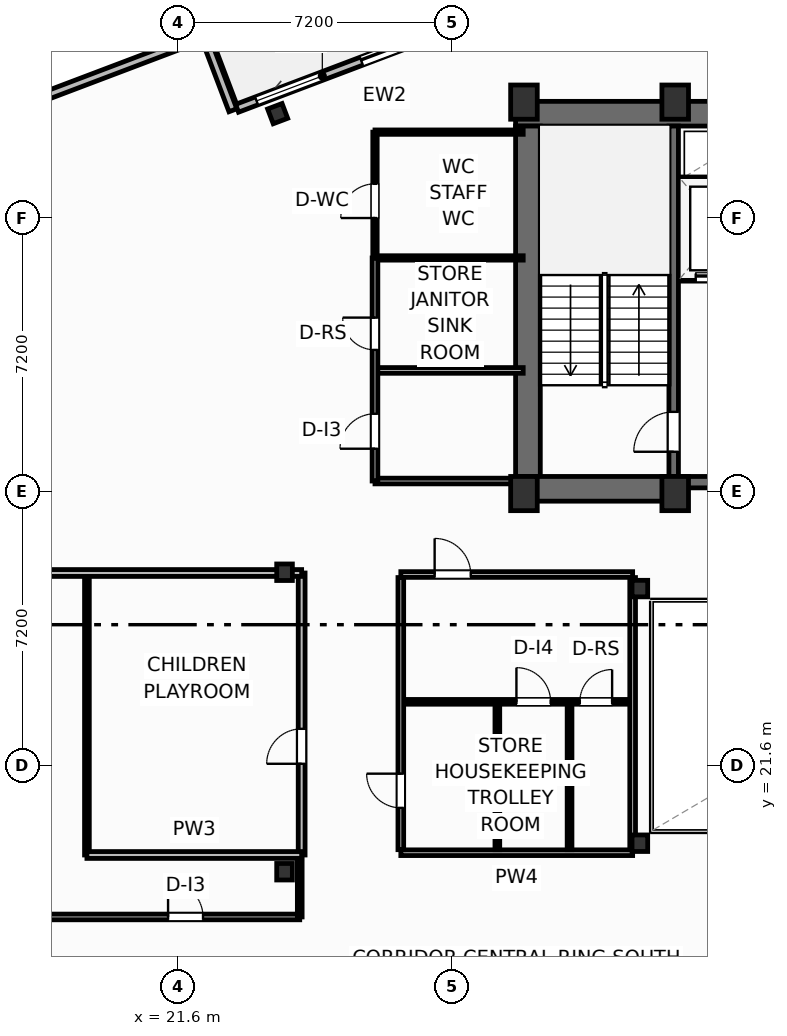
"""IFC4 building model, lengths in metres.
Left out: names, types, materials, properties, quantities, classifications, styles, units other than length and angle.
Written with IfcOpenShell. Run it as: python <this file> out.ifc"""

import sys

from ifc_helpers import new_model, si_unit, direction, frame, frame_2d, origin, origin_2d, place, context, subcontext, project, spatial, rectangle, i_section, extrude, element, fill, save


model = new_model("IFC4")
c1 = context("Model", 3, precision=1e-05, world=origin(), true_north=direction((0.0, 1.0)))
c2 = subcontext(c1, "Body", "Model", "MODEL_VIEW")
j1 = project(units=[si_unit("LENGTHUNIT", "METRE"), si_unit("PLANEANGLEUNIT", "RADIAN")], contexts=[c1])
p1 = place(None, origin())
s1 = spatial("IfcSite", under=j1, at=p1, CompositionType="ELEMENT")
p2 = place(p1, origin())
s2 = spatial("IfcBuilding", under=s1, at=p2, CompositionType="ELEMENT")
p3 = place(p2, frame((0.0, 0.0, 223.8)))
s3 = spatial("IfcBuildingStorey", under=s2, at=p3, CompositionType="ELEMENT", Elevation=223.8)
for number, where, z_axis, x_axis in (
    (1, (30.7, 28.75, 0.0), (0.0, 0.0, 1.0), (1.0, 0.0, 0.0)),
    (2, (34.68, 28.75, 0.0), (0.0, 0.0, 1.0), (1.0, 0.0, 0.0)),
    (3, (30.7, 39.05, 0.0), (0.0, 0.0, 1.0), (1.0, 0.0, 0.0)),
    (4, (34.68, 39.05, 0.0), (0.0, 0.0, 1.0), (1.0, 0.0, 0.0)),
):
    element("IfcColumn", number, at=place(p3, frame(where, z_axis=z_axis, x_axis=x_axis)), inside=s3, PredefinedType="COLUMN", context=c2, shape_type="SweptSolid", body=[
        extrude(rectangle(XDim=0.7, YDim=0.9, at=origin_2d()), origin(), (0.0, 0.0, 1.0), 3.7),
    ])
for number, where, z_axis, x_axis in (
    (5, (33.75, 19.55, 0.0), (0.0, 0.0, 1.0), (1.0, 0.0, 0.0)),
    (6, (33.75, 26.25, 0.0), (0.0, 0.0, 1.0), (1.0, 0.0, 0.0)),
    (7, (24.4, 18.8, 0.0), (0.0, 0.0, 1.0), (1.0, 0.0, 0.0)),
    (8, (24.4, 26.68, 0.0), (0.0, 0.0, 1.0), (1.0, 0.0, 0.0)),
):
    element("IfcColumn", number, at=place(p3, frame(where, z_axis=z_axis, x_axis=x_axis)), inside=s3, PredefinedType="COLUMN", context=c2, shape_type="SweptSolid", body=[
        extrude(i_section(OverallWidth=0.412, OverallDepth=0.435, WebThickness=0.036, FlangeThickness=0.057, FilletRadius=0.025, at=origin_2d()), origin(), (0.0, 0.0, 1.0), 3.7),
    ])
p4 = place(p3, frame((30.48, 38.745, 0.0), z_axis=(0.0, 0.0, 1.0), x_axis=(1.0, 0.0, 0.0)))
e9 = element("IfcWall", 9, at=p4, inside=s3, PredefinedType="SHEAR", context=c2, shape_type="SweptSolid", body=[
    extrude(rectangle(XDim=17.44, YDim=0.65, at=frame_2d((8.72, 0.0))), origin(), (0.0, 0.0, 1.0), 3.45),
])
p5 = place(p3, frame((30.805, 29.2, 0.0), z_axis=(0.0, 0.0, 1.0), x_axis=(0.0, 1.0, 0.0)))
e10 = element("IfcWall", 10, at=p5, inside=s3, PredefinedType="SHEAR", context=c2, shape_type="SweptSolid", body=[
    extrude(rectangle(XDim=9.22, YDim=0.65, at=frame_2d((4.61, 0.0))), origin(), (0.0, 0.0, 1.0), 3.45),
])
p6 = place(p3, frame((30.48, 28.875, 0.0), z_axis=(0.0, 0.0, 1.0), x_axis=(1.0, 0.0, 0.0)))
e11 = element("IfcWall", 11, at=p6, inside=s3, PredefinedType="SHEAR", context=c2, shape_type="SweptSolid", body=[
    extrude(rectangle(XDim=4.32, YDim=0.65, at=frame_2d((2.16, 0.0))), origin(), (0.0, 0.0, 1.0), 3.45),
])
p7 = place(p3, frame((34.8, 29.05, 0.0), z_axis=(0.0, 0.0, 1.0), x_axis=(1.0, 0.0, 0.0)))
e12 = element("IfcWall", 12, at=p7, inside=s3, PredefinedType="SHEAR", context=c2, shape_type="SweptSolid", body=[
    extrude(rectangle(XDim=8.8, YDim=0.3, at=frame_2d((4.4, 0.0))), origin(), (0.0, 0.0, 1.0), 3.45),
])
p8 = place(p7, frame((0.95, 0.0, 0.0)))
e13 = element("IfcOpeningElement", 13, at=p8, cuts=e12, PredefinedType="OPENING", context=c2, shape_type="SweptSolid", body=[
    extrude(rectangle(XDim=1.1, YDim=2.15, at=frame_2d((0.55, 1.075))), frame((0.0, 0.16, 0.0), z_axis=(0.0, -1.0, 0.0), x_axis=(1.0, 0.0, 0.0)), (0.0, 0.0, 1.0), 0.32),
])
p9 = place(p7, frame((6.75, 0.0, 0.0)))
e14 = element("IfcOpeningElement", 14, at=p9, cuts=e12, PredefinedType="OPENING", context=c2, shape_type="SweptSolid", body=[
    extrude(rectangle(XDim=1.1, YDim=2.15, at=frame_2d((0.55, 1.075))), frame((0.0, 0.16, 0.0), z_axis=(0.0, -1.0, 0.0), x_axis=(1.0, 0.0, 0.0)), (0.0, 0.0, 1.0), 0.32),
])
p10 = place(p7, frame((4.45, 0.0, 0.0)))
e15 = element("IfcOpeningElement", 15, at=p10, cuts=e12, PredefinedType="OPENING", context=c2, shape_type="SweptSolid", body=[
    extrude(rectangle(XDim=0.95, YDim=2.15, at=frame_2d((0.475, 1.075))), frame((0.0, 0.16, 0.0), z_axis=(0.0, -1.0, 0.0), x_axis=(1.0, 0.0, 0.0)), (0.0, 0.0, 1.0), 0.32),
])
p11 = place(p3, frame((34.64, 29.2, 0.0), z_axis=(0.0, 0.0, 1.0), x_axis=(0.0, 1.0, 0.0)))
e16 = element("IfcWall", 16, at=p11, inside=s3, PredefinedType="SHEAR", context=c2, shape_type="SweptSolid", body=[
    extrude(rectangle(XDim=9.22, YDim=0.25, at=frame_2d((4.61, 0.0))), origin(), (0.0, 0.0, 1.0), 3.45),
])
p12 = place(p11, frame((0.65, 0.0, 0.0)))
e17 = element("IfcOpeningElement", 17, at=p12, cuts=e16, PredefinedType="OPENING", context=c2, shape_type="SweptSolid", body=[
    extrude(rectangle(XDim=1.05, YDim=2.15, at=frame_2d((0.525, 1.075))), frame((0.0, 0.135, 0.0), z_axis=(0.0, -1.0, 0.0), x_axis=(1.0, 0.0, 0.0)), (0.0, 0.0, 1.0), 0.27),
])
p13 = place(p3, frame((24.219, 38.747, 0.0), z_axis=(0.0, 0.0, 1.0), x_axis=(0.935221751401, 0.354062530786, 0.0)))
e18 = element("IfcColumn", 18, at=p13, inside=s3, PredefinedType="COLUMN", context=c2, shape_type="SweptSolid", body=[
    extrude(i_section(OverallWidth=0.406, OverallDepth=0.416, WebThickness=0.03, FlangeThickness=0.048, FilletRadius=0.025, at=origin_2d()), origin(), (0.0, 0.0, 1.0), 3.7),
])
p14 = place(p3, frame((23.149, 38.887, 0.0), z_axis=(0.0, 0.0, 1.0), x_axis=(0.9352192676, 0.354069091436, 0.0)))
e19 = element("IfcWall", 19, at=p14, inside=s3, PredefinedType="SOLIDWALL", context=c2, shape_type="SweptSolid", body=[
    extrude(rectangle(XDim=6.0, YDim=0.22, at=frame_2d((3.0, 0.0))), origin(), (0.0, 0.0, 1.0), 2.73),
])
p15 = place(p14, frame((3.5, 0.0, 0.0)))
e20 = element("IfcOpeningElement", 20, at=p15, cuts=e19, PredefinedType="OPENING", context=c2, shape_type="SweptSolid", body=[
    extrude(rectangle(XDim=2.1, YDim=2.3, at=frame_2d((1.05, 1.15))), frame((0.0, 0.12, 0.0), z_axis=(0.0, -1.0, 0.0), x_axis=(1.0, 0.0, 0.0)), (0.0, 0.0, 1.0), 0.24),
])
p16 = place(p14, frame((0.55, 0.0, 0.75)))
e21 = element("IfcOpeningElement", 21, at=p16, cuts=e19, PredefinedType="OPENING", context=c2, shape_type="SweptSolid", body=[
    extrude(rectangle(XDim=1.85, YDim=1.75, at=frame_2d((0.925, 0.875))), frame((0.0, 0.12, 0.0), z_axis=(0.0, -1.0, 0.0), x_axis=(1.0, 0.0, 0.0)), (0.0, 0.0, 1.0), 0.24),
])
p17 = place(p3, frame((23.041, 38.835, 0.0), z_axis=(0.0, 0.0, 1.0), x_axis=(-0.354128469405, 0.935196785258, 0.0)))
e22 = element("IfcWall", 22, at=p17, inside=s3, PredefinedType="SOLIDWALL", context=c2, shape_type="SweptSolid", body=[
    extrude(rectangle(XDim=2.1, YDim=0.22, at=frame_2d((1.05, 0.0))), origin(), (0.0, 0.0, 1.0), 2.73),
])
p18 = place(p3, frame((22.18, 40.755, 0.0), z_axis=(0.0, 0.0, 1.0), x_axis=(-0.935223867561, -0.354056941104, 0.0)))
e23 = element("IfcWall", 23, at=p18, inside=s3, PredefinedType="SOLIDWALL", context=c2, shape_type="SweptSolid", body=[
    extrude(rectangle(XDim=17.647, YDim=0.22, at=frame_2d((8.823, 0.0))), origin(), (0.0, 0.0, 1.0), 2.73),
])
p19 = place(p18, frame((7.774, 0.0, 0.8)))
e24 = element("IfcOpeningElement", 24, at=p19, cuts=e23, PredefinedType="OPENING", context=c2, shape_type="SweptSolid", body=[
    extrude(rectangle(XDim=2.1, YDim=1.75, at=frame_2d((1.05, 0.875))), frame((0.0, 0.12, 0.0), z_axis=(0.0, -1.0, 0.0), x_axis=(1.0, 0.0, 0.0)), (0.0, 0.0, 1.0), 0.24),
])
p20 = place(p3, frame((6.908, 17.61, 0.0), z_axis=(0.0, 0.0, 1.0), x_axis=(1.0, 0.0, 0.0)))
e25 = element("IfcWall", 25, at=p20, inside=s3, PredefinedType="PARTITIONING", context=c2, shape_type="SweptSolid", body=[
    extrude(rectangle(XDim=17.892, YDim=0.15, at=frame_2d((8.946, 0.0))), origin(), (0.0, 0.0, 1.0), 3.45),
])
p21 = place(p20, frame((14.427, 0.0, 0.0)))
e26 = element("IfcOpeningElement", 26, at=p21, cuts=e25, PredefinedType="OPENING", context=c2, shape_type="SweptSolid", body=[
    extrude(rectangle(XDim=0.92, YDim=2.05, at=frame_2d((0.46, 1.025))), frame((0.0, 0.085, 0.0), z_axis=(0.0, -1.0, 0.0), x_axis=(1.0, 0.0, 0.0)), (0.0, 0.0, 1.0), 0.17),
])
p22 = place(p3, frame((24.8, 17.61, 0.0), z_axis=(0.0, 0.0, 1.0), x_axis=(0.0, 1.0, 0.0)))
e27 = element("IfcWall", 27, at=p22, inside=s3, PredefinedType="PARTITIONING", context=c2, shape_type="SweptSolid", body=[
    extrude(rectangle(XDim=1.63, YDim=0.125, at=frame_2d((0.815, 0.0))), origin(), (0.0, 0.0, 1.0), 2.739),
])
p23 = place(p3, frame((24.85, 19.24, 0.0), z_axis=(0.0, 0.0, 1.0), x_axis=(0.0, 1.0, 0.0)))
e28 = element("IfcWall", 28, at=p23, inside=s3, PredefinedType="PARTITIONING", context=c2, shape_type="SweptSolid", body=[
    extrude(rectangle(XDim=7.42, YDim=0.18, at=frame_2d((3.71, 0.0))), origin(), (0.0, 0.0, 1.0), 3.45),
])
p24 = place(p23, frame((2.4, 0.0, 0.0)))
e29 = element("IfcOpeningElement", 29, at=p24, cuts=e28, PredefinedType="OPENING", context=c2, shape_type="SweptSolid", body=[
    extrude(rectangle(XDim=0.92, YDim=2.05, at=frame_2d((0.46, 1.025))), frame((0.0, 0.1, 0.0), z_axis=(0.0, -1.0, 0.0), x_axis=(1.0, 0.0, 0.0)), (0.0, 0.0, 1.0), 0.2),
])
p25 = place(p3, frame((19.2, 19.24, 0.0), z_axis=(0.0, 0.0, 1.0), x_axis=(0.0, 1.0, 0.0)))
e30 = element("IfcWall", 30, at=p25, inside=s3, PredefinedType="PARTITIONING", context=c2, shape_type="SweptSolid", body=[
    extrude(rectangle(XDim=7.42, YDim=0.125, at=frame_2d((3.71, 0.0))), origin(), (0.0, 0.0, 1.0), 3.45),
])
p26 = place(p3, frame((19.2, 19.24, 0.0), z_axis=(0.0, 0.0, 1.0), x_axis=(1.0, 0.0, 0.0)))
e31 = element("IfcWall", 31, at=p26, inside=s3, PredefinedType="PARTITIONING", context=c2, shape_type="SweptSolid", body=[
    extrude(rectangle(XDim=5.65, YDim=0.18, at=frame_2d((2.825, 0.0))), origin(), (0.0, 0.0, 1.0), 3.45),
])
p27 = place(p3, frame((3.482, 26.66, 0.0), z_axis=(0.0, 0.0, 1.0), x_axis=(1.0, 0.0, 0.0)))
e32 = element("IfcWall", 32, at=p27, inside=s3, PredefinedType="PARTITIONING", context=c2, shape_type="SweptSolid", body=[
    extrude(rectangle(XDim=21.368, YDim=0.18, at=frame_2d((10.684, 0.0))), origin(), (0.0, 0.0, 1.0), 2.662),
])
p28 = place(p3, frame((34.8, 34.44, 0.0), z_axis=(0.0, 0.0, 1.0), x_axis=(1.0, 0.0, 0.0)))
e33 = element("IfcWall", 33, at=p28, inside=s3, PredefinedType="PARTITIONING", context=c2, shape_type="SweptSolid", body=[
    extrude(rectangle(XDim=2.18, YDim=0.2, at=frame_2d((1.09, 0.0))), origin(), (0.0, 0.0, 1.0), 3.45),
])
p29 = place(p28, frame((0.42, 0.0, 0.0)))
e34 = element("IfcOpeningElement", 34, at=p29, cuts=e33, PredefinedType="OPENING", context=c2, shape_type="SweptSolid", body=[
    extrude(rectangle(XDim=1.2, YDim=2.2, at=frame_2d((0.6, 1.1))), frame((0.0, 0.11, 0.0), z_axis=(0.0, -1.0, 0.0), x_axis=(1.0, 0.0, 0.0)), (0.0, 0.0, 1.0), 0.22),
])
p30 = place(p3, frame((34.8, 36.98, 0.0), z_axis=(0.0, 0.0, 1.0), x_axis=(1.0, 0.0, 0.0)))
e35 = element("IfcWall", 35, at=p30, inside=s3, PredefinedType="PARTITIONING", context=c2, shape_type="SweptSolid", body=[
    extrude(rectangle(XDim=2.18, YDim=0.2, at=frame_2d((1.09, 0.0))), origin(), (0.0, 0.0, 1.0), 3.45),
])
p31 = place(p3, frame((27.46, 26.62, 0.0), z_axis=(0.0, 0.0, 1.0), x_axis=(1.0, 0.0, 0.0)))
e36 = element("IfcWall", 36, at=p31, inside=s3, PredefinedType="PARTITIONING", context=c2, shape_type="SweptSolid", body=[
    extrude(rectangle(XDim=6.1, YDim=0.15, at=frame_2d((3.05, 0.0))), origin(), (0.0, 0.0, 1.0), 2.662),
])
p32 = place(p31, frame((0.89, 0.0, 0.0)))
e37 = element("IfcOpeningElement", 37, at=p32, cuts=e36, PredefinedType="OPENING", context=c2, shape_type="SweptSolid", body=[
    extrude(rectangle(XDim=0.95, YDim=2.05, at=frame_2d((0.475, 1.025))), frame((0.0, 0.085, 0.0), z_axis=(0.0, -1.0, 0.0), x_axis=(1.0, 0.0, 0.0)), (0.0, 0.0, 1.0), 0.17),
])
p33 = place(p3, frame((27.46, 19.3, 0.0), z_axis=(0.0, 0.0, 1.0), x_axis=(1.0, 0.0, 0.0)))
e38 = element("IfcWall", 38, at=p33, inside=s3, PredefinedType="PARTITIONING", context=c2, shape_type="SweptSolid", body=[
    extrude(rectangle(XDim=6.1, YDim=0.15, at=frame_2d((3.05, 0.0))), origin(), (0.0, 0.0, 1.0), 2.662),
])
p34 = place(p3, frame((27.52, 23.27, 0.0), z_axis=(0.0, 0.0, 1.0), x_axis=(1.0, 0.0, 0.0)))
e39 = element("IfcWall", 39, at=p34, inside=s3, PredefinedType="PARTITIONING", context=c2, shape_type="SweptSolid", body=[
    extrude(rectangle(XDim=6.0, YDim=0.125, at=frame_2d((3.0, 0.0))), origin(), (0.0, 0.0, 1.0), 3.45),
])
p35 = place(p34, frame((2.982, 0.0, 0.0)))
e40 = element("IfcOpeningElement", 40, at=p35, cuts=e39, PredefinedType="OPENING", context=c2, shape_type="SweptSolid", body=[
    extrude(rectangle(XDim=0.9, YDim=2.05, at=frame_2d((0.45, 1.025))), frame((0.0, 0.073, 0.0), z_axis=(0.0, -1.0, 0.0), x_axis=(1.0, 0.0, 0.0)), (0.0, 0.0, 1.0), 0.145),
])
p36 = place(p34, frame((4.65, 0.0, 0.0)))
e41 = element("IfcOpeningElement", 41, at=p36, cuts=e39, PredefinedType="OPENING", context=c2, shape_type="SweptSolid", body=[
    extrude(rectangle(XDim=0.85, YDim=2.05, at=frame_2d((0.425, 1.025))), frame((0.0, 0.073, 0.0), z_axis=(0.0, -1.0, 0.0), x_axis=(1.0, 0.0, 0.0)), (0.0, 0.0, 1.0), 0.145),
])
for number, where, z_axis, x_axis in (
    (42, (30.0, 19.38, 0.0), (0.0, 0.0, 1.0), (0.0, 1.0, 0.0)),
    (43, (31.9, 19.38, 0.0), (0.0, 0.0, 1.0), (0.0, 1.0, 0.0)),
):
    element("IfcWall", number, at=place(p3, frame(where, z_axis=z_axis, x_axis=x_axis)), inside=s3, PredefinedType="PARTITIONING", context=c2, shape_type="SweptSolid", body=[
        extrude(rectangle(XDim=3.82, YDim=0.125, at=frame_2d((1.91, 0.0))), origin(), (0.0, 0.0, 1.0), 3.45),
    ])
p37 = place(p3, frame((27.46, 19.38, 0.0), z_axis=(0.0, 0.0, 1.0), x_axis=(0.0, 1.0, 0.0)))
e44 = element("IfcWall", 44, at=p37, inside=s3, PredefinedType="PARTITIONING", context=c2, shape_type="SweptSolid", body=[
    extrude(rectangle(XDim=7.16, YDim=0.15, at=frame_2d((3.58, 0.0))), origin(), (0.0, 0.0, 1.0), 3.45),
])
p38 = place(p37, frame((1.1, 0.0, 0.0)))
e45 = element("IfcOpeningElement", 45, at=p38, cuts=e44, PredefinedType="OPENING", context=c2, shape_type="SweptSolid", body=[
    extrude(rectangle(XDim=0.9, YDim=2.05, at=frame_2d((0.45, 1.025))), frame((0.0, 0.085, 0.0), z_axis=(0.0, -1.0, 0.0), x_axis=(1.0, 0.0, 0.0)), (0.0, 0.0, 1.0), 0.17),
])
p39 = place(p3, frame((33.56, 19.38, 0.0), z_axis=(0.0, 0.0, 1.0), x_axis=(0.0, 1.0, 0.0)))
e46 = element("IfcWall", 46, at=p39, inside=s3, PredefinedType="PARTITIONING", context=c2, shape_type="SweptSolid", body=[
    extrude(rectangle(XDim=7.16, YDim=0.15, at=frame_2d((3.58, 0.0))), origin(), (0.0, 0.0, 1.0), 2.824),
])
p40 = place(p3, frame((26.78, 29.08, 0.0), z_axis=(0.0, 0.0, 1.0), x_axis=(1.0, 0.0, 0.0)))
e47 = element("IfcWall", 47, at=p40, inside=s3, PredefinedType="PARTITIONING", context=c2, shape_type="SweptSolid", body=[
    extrude(rectangle(XDim=3.7, YDim=0.15, at=frame_2d((1.85, 0.0))), origin(), (0.0, 0.0, 1.0), 3.45),
])
p41 = place(p3, frame((26.8, 31.99, 0.0), z_axis=(0.0, 0.0, 1.0), x_axis=(1.0, 0.0, 0.0)))
e48 = element("IfcWall", 48, at=p41, inside=s3, PredefinedType="PARTITIONING", context=c2, shape_type="SweptSolid", body=[
    extrude(rectangle(XDim=3.88, YDim=0.15, at=frame_2d((1.94, 0.0))), origin(), (0.0, 0.0, 1.0), 3.45),
])
p42 = place(p3, frame((26.8, 34.95, 0.0), z_axis=(0.0, 0.0, 1.0), x_axis=(1.0, 0.0, 0.0)))
e49 = element("IfcWall", 49, at=p42, inside=s3, PredefinedType="PARTITIONING", context=c2, shape_type="SweptSolid", body=[
    extrude(rectangle(XDim=3.88, YDim=0.115, at=frame_2d((1.94, 0.0))), origin(), (0.0, 0.0, 1.0), 3.45),
])
p43 = place(p3, frame((26.78, 38.26, 0.0), z_axis=(0.0, 0.0, 1.0), x_axis=(1.0, 0.0, 0.0)))
e50 = element("IfcWall", 50, at=p43, inside=s3, PredefinedType="PARTITIONING", context=c2, shape_type="SweptSolid", body=[
    extrude(rectangle(XDim=3.9, YDim=0.115, at=frame_2d((1.95, 0.0))), origin(), (0.0, 0.0, 1.0), 3.45),
])
p44 = place(p3, frame((26.78, 29.08, 0.0), z_axis=(0.0, 0.0, 1.0), x_axis=(0.0, 1.0, 0.0)))
e51 = element("IfcWall", 51, at=p44, inside=s3, PredefinedType="PARTITIONING", context=c2, shape_type="SweptSolid", body=[
    extrude(rectangle(XDim=5.87, YDim=0.15, at=frame_2d((2.935, 0.0))), origin(), (0.0, 0.0, 1.0), 3.45),
])
p45 = place(p44, frame((0.85, 0.0, 0.0)))
e52 = element("IfcOpeningElement", 52, at=p45, cuts=e51, PredefinedType="OPENING", context=c2, shape_type="SweptSolid", body=[
    extrude(rectangle(XDim=0.92, YDim=2.05, at=frame_2d((0.46, 1.025))), frame((0.0, 0.085, 0.0), z_axis=(0.0, -1.0, 0.0), x_axis=(1.0, 0.0, 0.0)), (0.0, 0.0, 1.0), 0.17),
])
p46 = place(p44, frame((3.45, 0.0, 0.0)))
e53 = element("IfcOpeningElement", 53, at=p46, cuts=e51, PredefinedType="OPENING", context=c2, shape_type="SweptSolid", body=[
    extrude(rectangle(XDim=0.85, YDim=2.05, at=frame_2d((0.425, 1.025))), frame((0.0, 0.085, 0.0), z_axis=(0.0, -1.0, 0.0), x_axis=(1.0, 0.0, 0.0)), (0.0, 0.0, 1.0), 0.17),
])
p47 = place(p3, frame((26.78, 34.95, 0.0), z_axis=(0.0, 0.0, 1.0), x_axis=(0.0, 1.0, 0.0)))
e54 = element("IfcWall", 54, at=p47, inside=s3, PredefinedType="PARTITIONING", context=c2, shape_type="SweptSolid", body=[
    extrude(rectangle(XDim=3.31, YDim=0.115, at=frame_2d((1.655, 0.0))), origin(), (0.0, 0.0, 1.0), 3.45),
])
p48 = place(p47, frame((1.05, 0.0, 0.0)))
e55 = element("IfcOpeningElement", 55, at=p48, cuts=e54, PredefinedType="OPENING", context=c2, shape_type="SweptSolid", body=[
    extrude(rectangle(XDim=0.9, YDim=2.05, at=frame_2d((0.45, 1.025))), frame((0.0, 0.067, 0.0), z_axis=(0.0, -1.0, 0.0), x_axis=(1.0, 0.0, 0.0)), (0.0, 0.0, 1.0), 0.135),
])
p49 = place(p15, origin())
e56 = element("IfcDoor", 56, at=p49, inside=s3, OperationType="SLIDING_TO_LEFT", PredefinedType="DOOR", context=c2, shape_type="SweptSolid", body=[
    extrude(rectangle(XDim=2.1, YDim=2.3, at=frame_2d((1.05, 1.15))), frame((0.0, 0.025, 0.0), z_axis=(0.0, -1.0, 0.0), x_axis=(1.0, 0.0, 0.0)), (0.0, 0.0, 1.0), 0.05),
])
fill(e20, e56)
p50 = place(p16, origin())
e57 = element("IfcWindow", 57, at=p50, inside=s3, PartitioningType="SINGLE_PANEL", PredefinedType="WINDOW", context=c2, shape_type="SweptSolid", body=[
    extrude(rectangle(XDim=1.85, YDim=1.75, at=frame_2d((0.925, 0.875))), frame((0.0, 0.03, 0.0), z_axis=(0.0, -1.0, 0.0), x_axis=(1.0, 0.0, 0.0)), (0.0, 0.0, 1.0), 0.06),
])
fill(e21, e57)
p51 = place(p21, origin())
e58 = element("IfcDoor", 58, at=p51, inside=s3, OperationType="SINGLE_SWING_LEFT", PredefinedType="DOOR", context=c2, shape_type="SweptSolid", body=[
    extrude(rectangle(XDim=0.92, YDim=2.05, at=frame_2d((0.46, 1.025))), frame((0.0, 0.025, 0.0), z_axis=(0.0, -1.0, 0.0), x_axis=(1.0, 0.0, 0.0)), (0.0, 0.0, 1.0), 0.05),
])
fill(e26, e58)
p52 = place(p24, origin())
e59 = element("IfcDoor", 59, at=p52, inside=s3, OperationType="SINGLE_SWING_LEFT", PredefinedType="DOOR", context=c2, shape_type="SweptSolid", body=[
    extrude(rectangle(XDim=0.92, YDim=2.05, at=frame_2d((0.46, 1.025))), frame((0.0, 0.025, 0.0), z_axis=(0.0, -1.0, 0.0), x_axis=(1.0, 0.0, 0.0)), (0.0, 0.0, 1.0), 0.05),
])
fill(e29, e59)
p53 = place(p12, origin())
e60 = element("IfcDoor", 60, at=p53, inside=s3, OperationType="SINGLE_SWING_LEFT", PredefinedType="DOOR", context=c2, shape_type="SweptSolid", body=[
    extrude(rectangle(XDim=1.05, YDim=2.15, at=frame_2d((0.525, 1.075))), frame((0.0, 0.025, 0.0), z_axis=(0.0, -1.0, 0.0), x_axis=(1.0, 0.0, 0.0)), (0.0, 0.0, 1.0), 0.05),
])
fill(e17, e60)
p54 = place(p29, origin())
e61 = element("IfcDoor", 61, at=p54, inside=s3, OperationType="SLIDING_TO_LEFT", PredefinedType="DOOR", context=c2, shape_type="SweptSolid", body=[
    extrude(rectangle(XDim=1.2, YDim=2.2, at=frame_2d((0.6, 1.1))), frame((0.0, 0.025, 0.0), z_axis=(0.0, -1.0, 0.0), x_axis=(1.0, 0.0, 0.0)), (0.0, 0.0, 1.0), 0.05),
])
fill(e34, e61)
p55 = place(p32, origin())
e62 = element("IfcDoor", 62, at=p55, inside=s3, OperationType="SINGLE_SWING_LEFT", PredefinedType="DOOR", context=c2, shape_type="SweptSolid", body=[
    extrude(rectangle(XDim=0.95, YDim=2.05, at=frame_2d((0.475, 1.025))), frame((0.0, 0.025, 0.0), z_axis=(0.0, -1.0, 0.0), x_axis=(1.0, 0.0, 0.0)), (0.0, 0.0, 1.0), 0.05),
])
fill(e37, e62)
p56 = place(p35, origin())
e63 = element("IfcDoor", 63, at=p56, inside=s3, OperationType="SINGLE_SWING_LEFT", PredefinedType="DOOR", context=c2, shape_type="SweptSolid", body=[
    extrude(rectangle(XDim=0.9, YDim=2.05, at=frame_2d((0.45, 1.025))), frame((0.0, 0.025, 0.0), z_axis=(0.0, -1.0, 0.0), x_axis=(1.0, 0.0, 0.0)), (0.0, 0.0, 1.0), 0.05),
])
fill(e40, e63)
p57 = place(p36, origin())
e64 = element("IfcDoor", 64, at=p57, inside=s3, OperationType="SINGLE_SWING_RIGHT", PredefinedType="DOOR", context=c2, shape_type="SweptSolid", body=[
    extrude(rectangle(XDim=0.85, YDim=2.05, at=frame_2d((0.425, 1.025))), frame((0.0, 0.025, 0.0), z_axis=(0.0, -1.0, 0.0), x_axis=(1.0, 0.0, 0.0)), (0.0, 0.0, 1.0), 0.05),
])
fill(e41, e64)
p58 = place(p38, origin())
e65 = element("IfcDoor", 65, at=p58, inside=s3, OperationType="SINGLE_SWING_RIGHT", PredefinedType="DOOR", context=c2, shape_type="SweptSolid", body=[
    extrude(rectangle(XDim=0.9, YDim=2.05, at=frame_2d((0.45, 1.025))), frame((0.0, 0.025, 0.0), z_axis=(0.0, -1.0, 0.0), x_axis=(1.0, 0.0, 0.0)), (0.0, 0.0, 1.0), 0.05),
])
fill(e45, e65)
p59 = place(p45, origin())
e66 = element("IfcDoor", 66, at=p59, inside=s3, OperationType="SINGLE_SWING_LEFT", PredefinedType="DOOR", context=c2, shape_type="SweptSolid", body=[
    extrude(rectangle(XDim=0.92, YDim=2.05, at=frame_2d((0.46, 1.025))), frame((0.0, 0.025, 0.0), z_axis=(0.0, -1.0, 0.0), x_axis=(1.0, 0.0, 0.0)), (0.0, 0.0, 1.0), 0.05),
])
fill(e52, e66)
p60 = place(p46, origin())
e67 = element("IfcDoor", 67, at=p60, inside=s3, OperationType="SINGLE_SWING_RIGHT", PredefinedType="DOOR", context=c2, shape_type="SweptSolid", body=[
    extrude(rectangle(XDim=0.85, YDim=2.05, at=frame_2d((0.425, 1.025))), frame((0.0, 0.025, 0.0), z_axis=(0.0, -1.0, 0.0), x_axis=(1.0, 0.0, 0.0)), (0.0, 0.0, 1.0), 0.05),
])
fill(e53, e67)
p61 = place(p48, origin())
e68 = element("IfcDoor", 68, at=p61, inside=s3, OperationType="SINGLE_SWING_LEFT", PredefinedType="DOOR", context=c2, shape_type="SweptSolid", body=[
    extrude(rectangle(XDim=0.9, YDim=2.05, at=frame_2d((0.45, 1.025))), frame((0.0, 0.025, 0.0), z_axis=(0.0, -1.0, 0.0), x_axis=(1.0, 0.0, 0.0)), (0.0, 0.0, 1.0), 0.05),
])
fill(e55, e68)
save(model, sys.argv[1])
